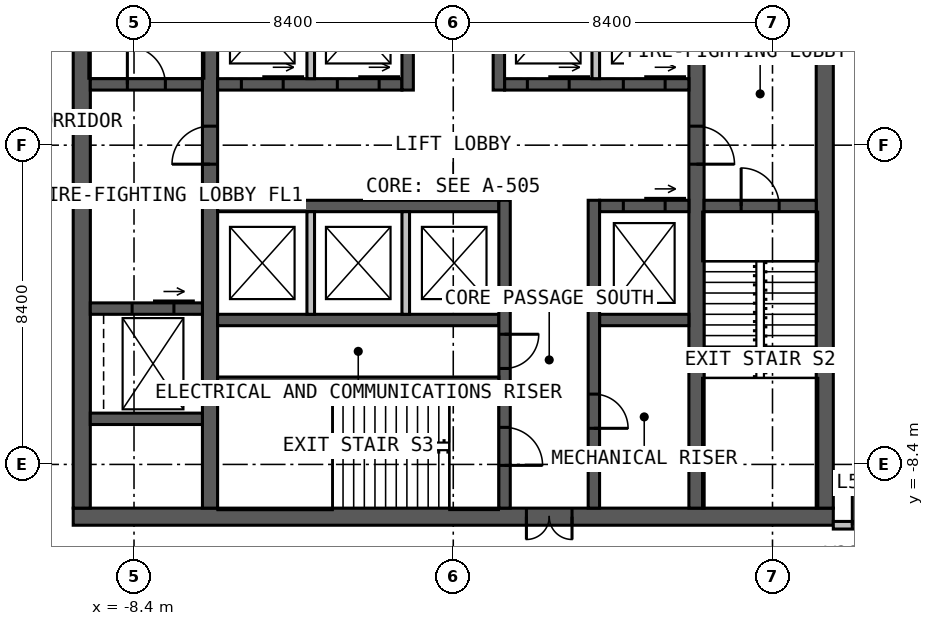
"""IFC4 building model, lengths in metres.
Left out: names, types, materials, properties, quantities, classifications, styles, units other than length and angle.
Written with IfcOpenShell. Run it as: python <this file> out.ifc"""

import sys

from ifc_helpers import new_model, si_unit, direction, frame, frame_2d, origin, place, context, subcontext, project, spatial, rectangle, extrude, element, fill, save


model = new_model("IFC4")
c1 = context("Model", 3, precision=1e-05, world=origin(), true_north=direction((0.0, 1.0)))
c2 = subcontext(c1, "Body", "Model", "MODEL_VIEW")
j1 = project(units=[si_unit("LENGTHUNIT", "METRE"), si_unit("PLANEANGLEUNIT", "RADIAN")], contexts=[c1])
p1 = place(None, origin())
s1 = spatial("IfcSite", under=j1, at=p1, CompositionType="ELEMENT")
p2 = place(p1, origin())
s2 = spatial("IfcBuilding", under=s1, at=p2, CompositionType="ELEMENT")
p3 = place(p2, frame((0.0, 0.0, 207.0)))
s3 = spatial("IfcBuildingStorey", under=s2, at=p3, CompositionType="ELEMENT", Elevation=207.0)
p4 = place(p3, frame((10.0, -9.775, 0.0), z_axis=(0.0, 0.0, 1.0), x_axis=(-1.0, 0.0, 0.0)))
e1 = element("IfcWall", 1, at=p4, inside=s3, PredefinedType="SOLIDWALL", context=c2, shape_type="SweptSolid", body=[
    extrude(rectangle(XDim=20.0, YDim=0.45, at=frame_2d((10.0, 0.0))), origin(), (0.0, 0.0, 1.0), 4.0),
])
p5 = place(p4, frame((6.875, 0.0, 0.0)))
e2 = element("IfcOpeningElement", 2, at=p5, cuts=e1, PredefinedType="OPENING", context=c2, shape_type="SweptSolid", body=[
    extrude(rectangle(XDim=1.2, YDim=2.2, at=frame_2d((0.6, 1.1))), frame((0.0, 0.235, 0.0), z_axis=(0.0, -1.0, 0.0), x_axis=(1.0, 0.0, 0.0)), (0.0, 0.0, 1.0), 0.47),
])
for number, where, z_axis, x_axis in (
    (3, (9.775, -9.55, 0.0), (0.0, 0.0, 1.0), (0.0, 1.0, 0.0)),
    (4, (-9.775, 9.55, 0.0), (0.0, 0.0, 1.0), (0.0, -1.0, 0.0)),
):
    element("IfcWall", number, at=place(p3, frame(where, z_axis=z_axis, x_axis=x_axis)), inside=s3, PredefinedType="SOLIDWALL", context=c2, shape_type="SweptSolid", body=[
        extrude(rectangle(XDim=19.1, YDim=0.45, at=frame_2d((9.55, 0.0))), origin(), (0.0, 0.0, 1.0), 4.0),
    ])
p6 = place(p3, frame((-6.4, -9.55, 0.0), z_axis=(0.0, 0.0, 1.0), x_axis=(0.0, 1.0, 0.0)))
e5 = element("IfcWall", 5, at=p6, inside=s3, PredefinedType="SOLIDWALL", context=c2, shape_type="SweptSolid", body=[
    extrude(rectangle(XDim=19.1, YDim=0.4, at=frame_2d((9.55, 0.0))), origin(), (0.0, 0.0, 1.0), 4.0),
])
p7 = place(p6, frame((9.05, 0.0, 0.0)))
e6 = element("IfcOpeningElement", 6, at=p7, cuts=e5, PredefinedType="OPENING", context=c2, shape_type="SweptSolid", body=[
    extrude(rectangle(XDim=1.0, YDim=2.2, at=frame_2d((0.5, 1.1))), frame((0.0, 0.21, 0.0), z_axis=(0.0, -1.0, 0.0), x_axis=(1.0, 0.0, 0.0)), (0.0, 0.0, 1.0), 0.42),
])
p8 = place(p3, frame((6.4, 9.55, 0.0), z_axis=(0.0, 0.0, 1.0), x_axis=(0.0, -1.0, 0.0)))
e7 = element("IfcWall", 7, at=p8, inside=s3, PredefinedType="SOLIDWALL", context=c2, shape_type="SweptSolid", body=[
    extrude(rectangle(XDim=19.1, YDim=0.4, at=frame_2d((9.55, 0.0))), origin(), (0.0, 0.0, 1.0), 4.0),
])
p9 = place(p8, frame((9.05, 0.0, 0.0)))
e8 = element("IfcOpeningElement", 8, at=p9, cuts=e7, PredefinedType="OPENING", context=c2, shape_type="SweptSolid", body=[
    extrude(rectangle(XDim=1.0, YDim=2.2, at=frame_2d((0.5, 1.1))), frame((0.0, 0.21, 0.0), z_axis=(0.0, -1.0, 0.0), x_axis=(1.0, 0.0, 0.0)), (0.0, 0.0, 1.0), 0.42),
])
p10 = place(p3, frame((-6.2, 1.6, 0.0), z_axis=(0.0, 0.0, 1.0), x_axis=(1.0, 0.0, 0.0)))
e9 = element("IfcWall", 9, at=p10, inside=s3, PredefinedType="SOLIDWALL", context=c2, shape_type="SweptSolid", body=[
    extrude(rectangle(XDim=4.85, YDim=0.3, at=frame_2d((2.425, 0.0))), origin(), (0.0, 0.0, 1.0), 4.0),
])
p11 = place(p10, frame((0.625, 0.0, 0.0)))
e10 = element("IfcOpeningElement", 10, at=p11, cuts=e9, PredefinedType="OPENING", context=c2, shape_type="SweptSolid", body=[
    extrude(rectangle(XDim=1.1, YDim=2.2, at=frame_2d((0.55, 1.1))), frame((0.0, 0.16, 0.0), z_axis=(0.0, -1.0, 0.0), x_axis=(1.0, 0.0, 0.0)), (0.0, 0.0, 1.0), 0.32),
])
p12 = place(p10, frame((3.15, 0.0, 0.0)))
e11 = element("IfcOpeningElement", 11, at=p12, cuts=e9, PredefinedType="OPENING", context=c2, shape_type="SweptSolid", body=[
    extrude(rectangle(XDim=1.1, YDim=2.2, at=frame_2d((0.55, 1.1))), frame((0.0, 0.16, 0.0), z_axis=(0.0, -1.0, 0.0), x_axis=(1.0, 0.0, 0.0)), (0.0, 0.0, 1.0), 0.32),
])
p13 = place(p3, frame((1.35, 1.6, 0.0), z_axis=(0.0, 0.0, 1.0), x_axis=(1.0, 0.0, 0.0)))
e12 = element("IfcWall", 12, at=p13, inside=s3, PredefinedType="SOLIDWALL", context=c2, shape_type="SweptSolid", body=[
    extrude(rectangle(XDim=4.85, YDim=0.3, at=frame_2d((2.425, 0.0))), origin(), (0.0, 0.0, 1.0), 4.0),
])
p14 = place(p13, frame((0.6, 0.0, 0.0)))
e13 = element("IfcOpeningElement", 13, at=p14, cuts=e12, PredefinedType="OPENING", context=c2, shape_type="SweptSolid", body=[
    extrude(rectangle(XDim=1.1, YDim=2.2, at=frame_2d((0.55, 1.1))), frame((0.0, 0.16, 0.0), z_axis=(0.0, -1.0, 0.0), x_axis=(1.0, 0.0, 0.0)), (0.0, 0.0, 1.0), 0.32),
])
p15 = place(p13, frame((3.125, 0.0, 0.0)))
e14 = element("IfcOpeningElement", 14, at=p15, cuts=e12, PredefinedType="OPENING", context=c2, shape_type="SweptSolid", body=[
    extrude(rectangle(XDim=1.1, YDim=2.2, at=frame_2d((0.55, 1.1))), frame((0.0, 0.16, 0.0), z_axis=(0.0, -1.0, 0.0), x_axis=(1.0, 0.0, 0.0)), (0.0, 0.0, 1.0), 0.32),
])
p16 = place(p3, frame((-1.2, 1.45, 0.0), z_axis=(0.0, 0.0, 1.0), x_axis=(0.0, 1.0, 0.0)))
e15 = element("IfcWall", 15, at=p16, inside=s3, PredefinedType="SOLIDWALL", context=c2, shape_type="SweptSolid", body=[
    extrude(rectangle(XDim=8.1, YDim=0.3, at=frame_2d((4.05, 0.0))), origin(), (0.0, 0.0, 1.0), 4.0),
])
p17 = place(p16, frame((5.05, 0.0, 0.0)))
e16 = element("IfcOpeningElement", 16, at=p17, cuts=e15, PredefinedType="OPENING", context=c2, shape_type="SweptSolid", body=[
    extrude(rectangle(XDim=1.0, YDim=2.2, at=frame_2d((0.5, 1.1))), frame((0.0, 0.16, 0.0), z_axis=(0.0, -1.0, 0.0), x_axis=(1.0, 0.0, 0.0)), (0.0, 0.0, 1.0), 0.32),
])
p18 = place(p3, frame((1.2, 1.45, 0.0), z_axis=(0.0, 0.0, 1.0), x_axis=(0.0, 1.0, 0.0)))
e17 = element("IfcWall", 17, at=p18, inside=s3, PredefinedType="SOLIDWALL", context=c2, shape_type="SweptSolid", body=[
    extrude(rectangle(XDim=8.1, YDim=0.3, at=frame_2d((4.05, 0.0))), origin(), (0.0, 0.0, 1.0), 4.0),
])
p19 = place(p18, frame((3.8, 0.0, 0.0)))
e18 = element("IfcOpeningElement", 18, at=p19, cuts=e17, PredefinedType="OPENING", context=c2, shape_type="SweptSolid", body=[
    extrude(rectangle(XDim=1.0, YDim=2.2, at=frame_2d((0.5, 1.1))), frame((0.0, 0.16, 0.0), z_axis=(0.0, -1.0, 0.0), x_axis=(1.0, 0.0, 0.0)), (0.0, 0.0, 1.0), 0.32),
])
p20 = place(p18, frame((6.15, 0.0, 0.0)))
e19 = element("IfcOpeningElement", 19, at=p20, cuts=e17, PredefinedType="OPENING", context=c2, shape_type="SweptSolid", body=[
    extrude(rectangle(XDim=1.0, YDim=2.2, at=frame_2d((0.5, 1.1))), frame((0.0, 0.16, 0.0), z_axis=(0.0, -1.0, 0.0), x_axis=(1.0, 0.0, 0.0)), (0.0, 0.0, 1.0), 0.32),
])
p21 = place(p3, frame((-6.2, -1.6, 0.0), z_axis=(0.0, 0.0, 1.0), x_axis=(1.0, 0.0, 0.0)))
e20 = element("IfcWall", 20, at=p21, inside=s3, PredefinedType="SOLIDWALL", context=c2, shape_type="SweptSolid", body=[
    extrude(rectangle(XDim=7.4, YDim=0.3, at=frame_2d((3.7, 0.0))), origin(), (0.0, 0.0, 1.0), 4.0),
])
p22 = place(p3, frame((3.85, -1.6, 0.0), z_axis=(0.0, 0.0, 1.0), x_axis=(1.0, 0.0, 0.0)))
e21 = element("IfcWall", 21, at=p22, inside=s3, PredefinedType="SOLIDWALL", context=c2, shape_type="SweptSolid", body=[
    extrude(rectangle(XDim=2.35, YDim=0.3, at=frame_2d((1.175, 0.0))), origin(), (0.0, 0.0, 1.0), 4.0),
])
p23 = place(p22, frame((0.625, 0.0, 0.0)))
e22 = element("IfcOpeningElement", 22, at=p23, cuts=e21, PredefinedType="OPENING", context=c2, shape_type="SweptSolid", body=[
    extrude(rectangle(XDim=1.1, YDim=2.2, at=frame_2d((0.55, 1.1))), frame((0.0, 0.16, 0.0), z_axis=(0.0, -1.0, 0.0), x_axis=(1.0, 0.0, 0.0)), (0.0, 0.0, 1.0), 0.32),
])
p24 = place(p3, frame((-6.2, -4.6, 0.0), z_axis=(0.0, 0.0, 1.0), x_axis=(1.0, 0.0, 0.0)))
e23 = element("IfcWall", 23, at=p24, inside=s3, PredefinedType="SOLIDWALL", context=c2, shape_type="SweptSolid", body=[
    extrude(rectangle(XDim=7.4, YDim=0.3, at=frame_2d((3.7, 0.0))), origin(), (0.0, 0.0, 1.0), 4.0),
])
p25 = place(p3, frame((3.85, -4.6, 0.0), z_axis=(0.0, 0.0, 1.0), x_axis=(1.0, 0.0, 0.0)))
e24 = element("IfcWall", 24, at=p25, inside=s3, PredefinedType="SOLIDWALL", context=c2, shape_type="SweptSolid", body=[
    extrude(rectangle(XDim=2.35, YDim=0.3, at=frame_2d((1.175, 0.0))), origin(), (0.0, 0.0, 1.0), 4.0),
])
p26 = place(p3, frame((1.35, -1.45, 0.0), z_axis=(0.0, 0.0, 1.0), x_axis=(0.0, -1.0, 0.0)))
e25 = element("IfcWall", 25, at=p26, inside=s3, PredefinedType="SOLIDWALL", context=c2, shape_type="SweptSolid", body=[
    extrude(rectangle(XDim=8.1, YDim=0.3, at=frame_2d((4.05, 0.0))), origin(), (0.0, 0.0, 1.0), 4.0),
])
p27 = place(p26, frame((5.975, 0.0, 0.0)))
e26 = element("IfcOpeningElement", 26, at=p27, cuts=e25, PredefinedType="OPENING", context=c2, shape_type="SweptSolid", body=[
    extrude(rectangle(XDim=1.0, YDim=2.2, at=frame_2d((0.5, 1.1))), frame((0.0, 0.16, 0.0), z_axis=(0.0, -1.0, 0.0), x_axis=(1.0, 0.0, 0.0)), (0.0, 0.0, 1.0), 0.32),
])
p28 = place(p26, frame((3.525, 0.0, 0.0)))
e27 = element("IfcOpeningElement", 27, at=p28, cuts=e25, PredefinedType="OPENING", context=c2, shape_type="SweptSolid", body=[
    extrude(rectangle(XDim=0.9, YDim=2.2, at=frame_2d((0.45, 1.1))), frame((0.0, 0.16, 0.0), z_axis=(0.0, -1.0, 0.0), x_axis=(1.0, 0.0, 0.0)), (0.0, 0.0, 1.0), 0.32),
])
p29 = place(p3, frame((3.7, -1.45, 0.0), z_axis=(0.0, 0.0, 1.0), x_axis=(0.0, -1.0, 0.0)))
e28 = element("IfcWall", 28, at=p29, inside=s3, PredefinedType="SOLIDWALL", context=c2, shape_type="SweptSolid", body=[
    extrude(rectangle(XDim=8.1, YDim=0.3, at=frame_2d((4.05, 0.0))), origin(), (0.0, 0.0, 1.0), 4.0),
])
p30 = place(p29, frame((5.1, 0.0, 0.0)))
e29 = element("IfcOpeningElement", 29, at=p30, cuts=e28, PredefinedType="OPENING", context=c2, shape_type="SweptSolid", body=[
    extrude(rectangle(XDim=0.9, YDim=2.2, at=frame_2d((0.45, 1.1))), frame((0.0, 0.16, 0.0), z_axis=(0.0, -1.0, 0.0), x_axis=(1.0, 0.0, 0.0)), (0.0, 0.0, 1.0), 0.32),
])
p31 = place(p3, frame((-6.2, -6.2, 0.0), z_axis=(0.0, 0.0, 1.0), x_axis=(1.0, 0.0, 0.0)))
e30 = element("IfcWall", 30, at=p31, inside=s3, PredefinedType="SOLIDWALL", context=c2, shape_type="SweptSolid", body=[
    extrude(rectangle(XDim=7.4, YDim=0.2, at=frame_2d((3.7, 0.0))), origin(), (0.0, 0.0, 1.0), 4.0),
])
p32 = place(p3, frame((-9.55, 1.6, 0.0), z_axis=(0.0, 0.0, 1.0), x_axis=(1.0, 0.0, 0.0)))
e31 = element("IfcWall", 31, at=p32, inside=s3, PredefinedType="SOLIDWALL", context=c2, shape_type="SweptSolid", body=[
    extrude(rectangle(XDim=2.95, YDim=0.3, at=frame_2d((1.475, 0.0))), origin(), (0.0, 0.0, 1.0), 4.0),
])
p33 = place(p32, frame((0.975, 0.0, 0.0)))
e32 = element("IfcOpeningElement", 32, at=p33, cuts=e31, PredefinedType="OPENING", context=c2, shape_type="SweptSolid", body=[
    extrude(rectangle(XDim=1.0, YDim=2.2, at=frame_2d((0.5, 1.1))), frame((0.0, 0.16, 0.0), z_axis=(0.0, -1.0, 0.0), x_axis=(1.0, 0.0, 0.0)), (0.0, 0.0, 1.0), 0.32),
])
p34 = place(p3, frame((6.6, -1.6, 0.0), z_axis=(0.0, 0.0, 1.0), x_axis=(1.0, 0.0, 0.0)))
e33 = element("IfcWall", 33, at=p34, inside=s3, PredefinedType="SOLIDWALL", context=c2, shape_type="SweptSolid", body=[
    extrude(rectangle(XDim=2.95, YDim=0.3, at=frame_2d((1.475, 0.0))), origin(), (0.0, 0.0, 1.0), 4.0),
])
p35 = place(p34, frame((0.975, 0.0, 0.0)))
e34 = element("IfcOpeningElement", 34, at=p35, cuts=e33, PredefinedType="OPENING", context=c2, shape_type="SweptSolid", body=[
    extrude(rectangle(XDim=1.0, YDim=2.2, at=frame_2d((0.5, 1.1))), frame((0.0, 0.16, 0.0), z_axis=(0.0, -1.0, 0.0), x_axis=(1.0, 0.0, 0.0)), (0.0, 0.0, 1.0), 0.32),
])
p36 = place(p3, frame((-9.55, -4.3, 0.0), z_axis=(0.0, 0.0, 1.0), x_axis=(1.0, 0.0, 0.0)))
e35 = element("IfcWall", 35, at=p36, inside=s3, PredefinedType="SOLIDWALL", context=c2, shape_type="SweptSolid", body=[
    extrude(rectangle(XDim=2.95, YDim=0.3, at=frame_2d((1.475, 0.0))), origin(), (0.0, 0.0, 1.0), 4.0),
])
p37 = place(p36, frame((1.1, 0.0, 0.0)))
e36 = element("IfcOpeningElement", 36, at=p37, cuts=e35, PredefinedType="OPENING", context=c2, shape_type="SweptSolid", body=[
    extrude(rectangle(XDim=1.1, YDim=2.2, at=frame_2d((0.55, 1.1))), frame((0.0, 0.16, 0.0), z_axis=(0.0, -1.0, 0.0), x_axis=(1.0, 0.0, 0.0)), (0.0, 0.0, 1.0), 0.32),
])
p38 = place(p3, frame((-9.55, -7.2, 0.0), z_axis=(0.0, 0.0, 1.0), x_axis=(1.0, 0.0, 0.0)))
e37 = element("IfcWall", 37, at=p38, inside=s3, PredefinedType="SOLIDWALL", context=c2, shape_type="SweptSolid", body=[
    extrude(rectangle(XDim=2.95, YDim=0.3, at=frame_2d((1.475, 0.0))), origin(), (0.0, 0.0, 1.0), 4.0),
])
for number, where, z_axis, x_axis in (
    (38, (-3.75, 1.75, 0.0), (0.0, 0.0, 1.0), (0.0, 1.0, 0.0)),
    (39, (3.75, 1.75, 0.0), (0.0, 0.0, 1.0), (0.0, 1.0, 0.0)),
    (40, (-3.75, -1.75, 0.0), (0.0, 0.0, 1.0), (0.0, -1.0, 0.0)),
    (41, (-1.25, -1.75, 0.0), (0.0, 0.0, 1.0), (0.0, -1.0, 0.0)),
):
    element("IfcWall", number, at=place(p3, frame(where, z_axis=z_axis, x_axis=x_axis)), inside=s3, PredefinedType="SOLIDWALL", context=c2, shape_type="SweptSolid", body=[
        extrude(rectangle(XDim=2.7, YDim=0.2, at=frame_2d((1.35, 0.0))), origin(), (0.0, 0.0, 1.0), 3.75),
    ])
p39 = place(p3, frame((10.0, -10.0, 0.0), z_axis=(0.0, 0.0, 1.0), x_axis=(1.0, 0.0, 0.0)))
e42 = element("IfcWall", 42, at=p39, inside=s3, PredefinedType="PARTITIONING", context=c2, shape_type="SweptSolid", body=[
    extrude(rectangle(XDim=2.0, YDim=0.2, at=frame_2d((1.0, 0.0))), origin(), (0.0, 0.0, 1.0), 3.8),
])
p40 = place(p39, frame((0.5, 0.0, 0.0)))
e43 = element("IfcOpeningElement", 43, at=p40, cuts=e42, PredefinedType="OPENING", context=c2, shape_type="SweptSolid", body=[
    extrude(rectangle(XDim=1.0, YDim=2.2, at=frame_2d((0.5, 1.1))), frame((0.0, 0.11, 0.0), z_axis=(0.0, -1.0, 0.0), x_axis=(1.0, 0.0, 0.0)), (0.0, 0.0, 1.0), 0.22),
])
p41 = place(p5, origin())
e44 = element("IfcDoor", 44, at=p41, inside=s3, OperationType="DOUBLE_DOOR_SINGLE_SWING", PredefinedType="DOOR", context=c2, shape_type="SweptSolid", body=[
    extrude(rectangle(XDim=1.2, YDim=2.2, at=frame_2d((0.6, 1.1))), frame((0.0, 0.025, 0.0), z_axis=(0.0, -1.0, 0.0), x_axis=(1.0, 0.0, 0.0)), (0.0, 0.0, 1.0), 0.05),
])
fill(e2, e44)
p42 = place(p7, origin())
e45 = element("IfcDoor", 45, at=p42, inside=s3, OperationType="SINGLE_SWING_LEFT", PredefinedType="DOOR", context=c2, shape_type="SweptSolid", body=[
    extrude(rectangle(XDim=1.0, YDim=2.2, at=frame_2d((0.5, 1.1))), frame((0.0, 0.025, 0.0), z_axis=(0.0, -1.0, 0.0), x_axis=(1.0, 0.0, 0.0)), (0.0, 0.0, 1.0), 0.05),
])
fill(e6, e45)
p43 = place(p9, origin())
e46 = element("IfcDoor", 46, at=p43, inside=s3, OperationType="SINGLE_SWING_RIGHT", PredefinedType="DOOR", context=c2, shape_type="SweptSolid", body=[
    extrude(rectangle(XDim=1.0, YDim=2.2, at=frame_2d((0.5, 1.1))), frame((0.0, 0.025, 0.0), z_axis=(0.0, -1.0, 0.0), x_axis=(1.0, 0.0, 0.0)), (0.0, 0.0, 1.0), 0.05),
])
fill(e8, e46)
p44 = place(p33, origin())
e47 = element("IfcDoor", 47, at=p44, inside=s3, OperationType="SINGLE_SWING_LEFT", PredefinedType="DOOR", context=c2, shape_type="SweptSolid", body=[
    extrude(rectangle(XDim=1.0, YDim=2.2, at=frame_2d((0.5, 1.1))), frame((0.0, 0.025, 0.0), z_axis=(0.0, -1.0, 0.0), x_axis=(1.0, 0.0, 0.0)), (0.0, 0.0, 1.0), 0.05),
])
fill(e32, e47)
p45 = place(p35, origin())
e48 = element("IfcDoor", 48, at=p45, inside=s3, OperationType="SINGLE_SWING_LEFT", PredefinedType="DOOR", context=c2, shape_type="SweptSolid", body=[
    extrude(rectangle(XDim=1.0, YDim=2.2, at=frame_2d((0.5, 1.1))), frame((0.0, 0.025, 0.0), z_axis=(0.0, -1.0, 0.0), x_axis=(1.0, 0.0, 0.0)), (0.0, 0.0, 1.0), 0.05),
])
fill(e34, e48)
p46 = place(p27, origin())
e49 = element("IfcDoor", 49, at=p46, inside=s3, OperationType="SINGLE_SWING_RIGHT", PredefinedType="DOOR", context=c2, shape_type="SweptSolid", body=[
    extrude(rectangle(XDim=1.0, YDim=2.2, at=frame_2d((0.5, 1.1))), frame((0.0, 0.025, 0.0), z_axis=(0.0, -1.0, 0.0), x_axis=(1.0, 0.0, 0.0)), (0.0, 0.0, 1.0), 0.05),
])
fill(e26, e49)
p47 = place(p28, origin())
e50 = element("IfcDoor", 50, at=p47, inside=s3, OperationType="SINGLE_SWING_LEFT", PredefinedType="DOOR", context=c2, shape_type="SweptSolid", body=[
    extrude(rectangle(XDim=0.9, YDim=2.2, at=frame_2d((0.45, 1.1))), frame((0.0, 0.025, 0.0), z_axis=(0.0, -1.0, 0.0), x_axis=(1.0, 0.0, 0.0)), (0.0, 0.0, 1.0), 0.05),
])
fill(e27, e50)
p48 = place(p30, origin())
e51 = element("IfcDoor", 51, at=p48, inside=s3, OperationType="SINGLE_SWING_RIGHT", PredefinedType="DOOR", context=c2, shape_type="SweptSolid", body=[
    extrude(rectangle(XDim=0.9, YDim=2.2, at=frame_2d((0.45, 1.1))), frame((0.0, 0.025, 0.0), z_axis=(0.0, -1.0, 0.0), x_axis=(1.0, 0.0, 0.0)), (0.0, 0.0, 1.0), 0.05),
])
fill(e29, e51)
p49 = place(p11, origin())
e52 = element("IfcDoor", 52, at=p49, inside=s3, OperationType="SLIDING_TO_LEFT", PredefinedType="DOOR", context=c2, shape_type="SweptSolid", body=[
    extrude(rectangle(XDim=1.1, YDim=2.2, at=frame_2d((0.55, 1.1))), frame((0.0, 0.025, 0.0), z_axis=(0.0, -1.0, 0.0), x_axis=(1.0, 0.0, 0.0)), (0.0, 0.0, 1.0), 0.05),
])
fill(e10, e52)
p50 = place(p12, origin())
e53 = element("IfcDoor", 53, at=p50, inside=s3, OperationType="SLIDING_TO_LEFT", PredefinedType="DOOR", context=c2, shape_type="SweptSolid", body=[
    extrude(rectangle(XDim=1.1, YDim=2.2, at=frame_2d((0.55, 1.1))), frame((0.0, 0.025, 0.0), z_axis=(0.0, -1.0, 0.0), x_axis=(1.0, 0.0, 0.0)), (0.0, 0.0, 1.0), 0.05),
])
fill(e11, e53)
p51 = place(p14, origin())
e54 = element("IfcDoor", 54, at=p51, inside=s3, OperationType="SLIDING_TO_LEFT", PredefinedType="DOOR", context=c2, shape_type="SweptSolid", body=[
    extrude(rectangle(XDim=1.1, YDim=2.2, at=frame_2d((0.55, 1.1))), frame((0.0, 0.025, 0.0), z_axis=(0.0, -1.0, 0.0), x_axis=(1.0, 0.0, 0.0)), (0.0, 0.0, 1.0), 0.05),
])
fill(e13, e54)
p52 = place(p15, origin())
e55 = element("IfcDoor", 55, at=p52, inside=s3, OperationType="SLIDING_TO_LEFT", PredefinedType="DOOR", context=c2, shape_type="SweptSolid", body=[
    extrude(rectangle(XDim=1.1, YDim=2.2, at=frame_2d((0.55, 1.1))), frame((0.0, 0.025, 0.0), z_axis=(0.0, -1.0, 0.0), x_axis=(1.0, 0.0, 0.0)), (0.0, 0.0, 1.0), 0.05),
])
fill(e14, e55)
p53 = place(p23, origin())
e56 = element("IfcDoor", 56, at=p53, inside=s3, OperationType="SLIDING_TO_LEFT", PredefinedType="DOOR", context=c2, shape_type="SweptSolid", body=[
    extrude(rectangle(XDim=1.1, YDim=2.2, at=frame_2d((0.55, 1.1))), frame((0.0, 0.025, 0.0), z_axis=(0.0, -1.0, 0.0), x_axis=(1.0, 0.0, 0.0)), (0.0, 0.0, 1.0), 0.05),
])
fill(e22, e56)
p54 = place(p37, origin())
e57 = element("IfcDoor", 57, at=p54, inside=s3, OperationType="SLIDING_TO_LEFT", PredefinedType="DOOR", context=c2, shape_type="SweptSolid", body=[
    extrude(rectangle(XDim=1.1, YDim=2.2, at=frame_2d((0.55, 1.1))), frame((0.0, 0.025, 0.0), z_axis=(0.0, -1.0, 0.0), x_axis=(1.0, 0.0, 0.0)), (0.0, 0.0, 1.0), 0.05),
])
fill(e36, e57)
p55 = place(p40, origin())
e58 = element("IfcDoor", 58, at=p55, inside=s3, OperationType="SINGLE_SWING_LEFT", PredefinedType="DOOR", context=c2, shape_type="SweptSolid", body=[
    extrude(rectangle(XDim=1.0, YDim=2.2, at=frame_2d((0.5, 1.1))), frame((0.0, 0.025, 0.0), z_axis=(0.0, -1.0, 0.0), x_axis=(1.0, 0.0, 0.0)), (0.0, 0.0, 1.0), 0.05),
])
fill(e43, e58)
save(model, sys.argv[1])
